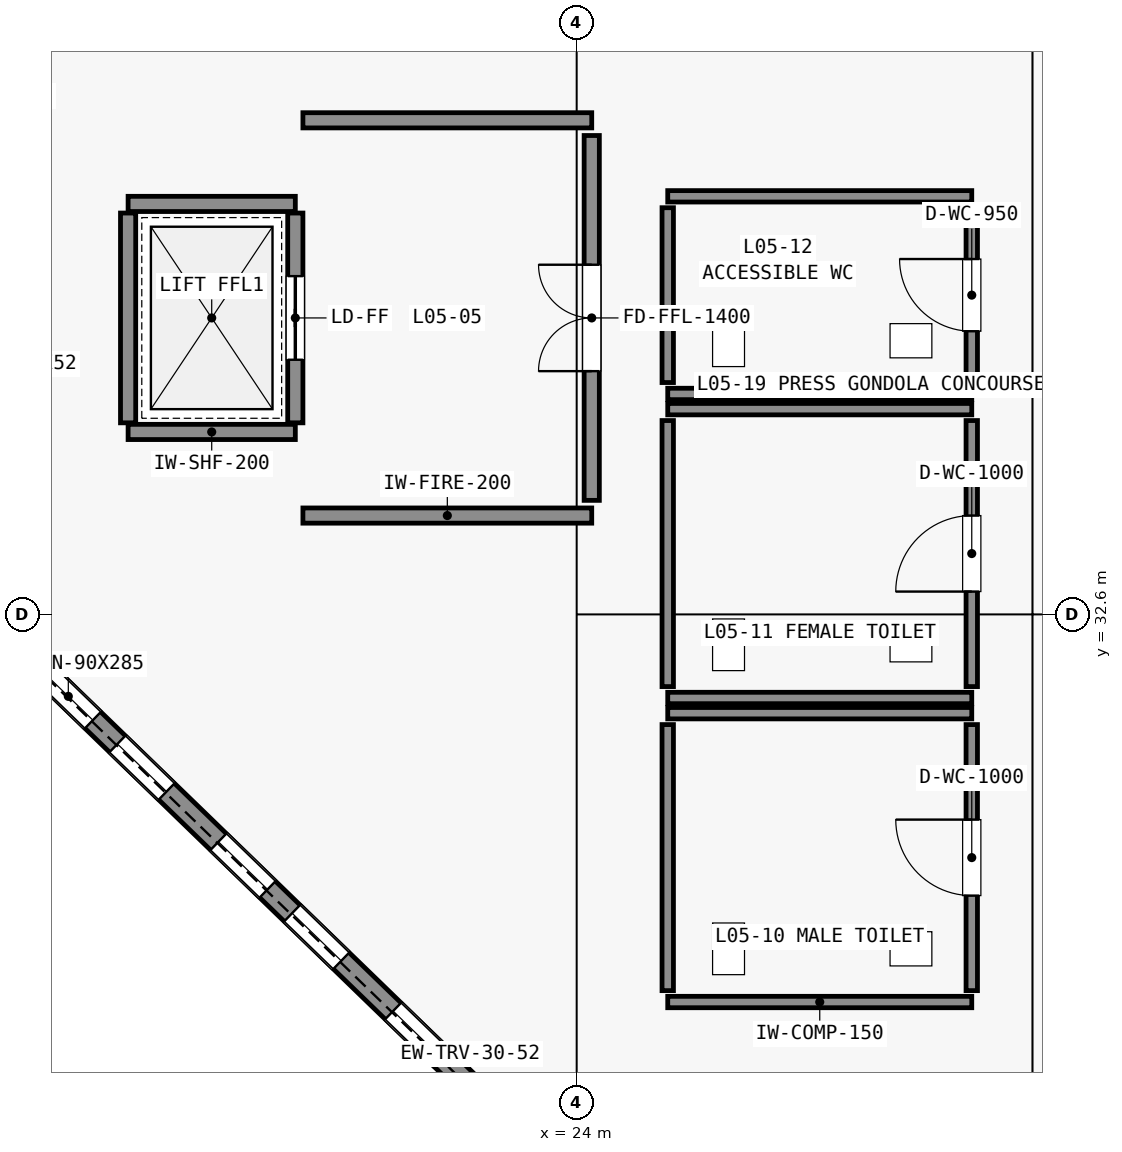
"""IFC4 building model, lengths in metres.
Left out: names, types, materials, properties, quantities, classifications, styles, units other than length and angle.
Written with IfcOpenShell. Run it as: python <this file> out.ifc"""

import sys

from ifc_helpers import new_model, si_unit, direction, frame, frame_2d, origin, place, context, subcontext, project, spatial, rectangle, extrude, element, fill, save


model = new_model("IFC4")
c1 = context("Model", 3, precision=1e-05, world=origin(), true_north=direction((0.0, 1.0)))
c2 = subcontext(c1, "Body", "Model", "MODEL_VIEW")
j1 = project(units=[si_unit("LENGTHUNIT", "METRE"), si_unit("PLANEANGLEUNIT", "RADIAN")], contexts=[c1])
p1 = place(None, origin())
s1 = spatial("IfcSite", under=j1, at=p1, CompositionType="ELEMENT")
p2 = place(p1, origin())
s2 = spatial("IfcBuilding", under=s1, at=p2, CompositionType="ELEMENT")
p3 = place(p2, frame((0.0, 0.0, 26.4)))
s3 = spatial("IfcBuildingStorey", under=s2, at=p3, CompositionType="ELEMENT", Elevation=26.4)
for number, where, z_axis, x_axis in (
    (1, (18.1, 35.0, 0.0), (0.0, 0.0, 1.0), (1.0, 0.0, 0.0)),
    (2, (18.1, 38.0, 0.0), (0.0, 0.0, 1.0), (1.0, 0.0, 0.0)),
):
    element("IfcWall", number, at=place(p3, frame(where, z_axis=z_axis, x_axis=x_axis)), inside=s3, PredefinedType="STANDARD", context=c2, shape_type="SweptSolid", body=[
        extrude(rectangle(XDim=2.2, YDim=0.2, at=frame_2d((1.1, 0.0))), origin(), (0.0, 0.0, 1.0), 5.18),
    ])
p4 = place(p3, frame((18.1, 35.12, 0.0), z_axis=(0.0, 0.0, 1.0), x_axis=(0.0, 1.0, 0.0)))
e3 = element("IfcWall", 3, at=p4, inside=s3, PredefinedType="STANDARD", context=c2, shape_type="SweptSolid", body=[
    extrude(rectangle(XDim=2.76, YDim=0.2, at=frame_2d((1.38, 0.0))), origin(), (0.0, 0.0, 1.0), 5.18),
])
p5 = place(p3, frame((20.3, 35.12, 0.0), z_axis=(0.0, 0.0, 1.0), x_axis=(0.0, 1.0, 0.0)))
e4 = element("IfcWall", 4, at=p5, inside=s3, PredefinedType="STANDARD", context=c2, shape_type="SweptSolid", body=[
    extrude(rectangle(XDim=2.76, YDim=0.2, at=frame_2d((1.38, 0.0))), origin(), (0.0, 0.0, 1.0), 5.18),
])
p6 = place(p5, frame((0.83, 0.0, 0.0)))
e5 = element("IfcOpeningElement", 5, at=p6, cuts=e4, PredefinedType="OPENING", context=c2, shape_type="SweptSolid", body=[
    extrude(rectangle(XDim=1.1, YDim=2.15, at=frame_2d((0.55, 1.075))), frame((0.0, 0.11, 0.0), z_axis=(0.0, -1.0, 0.0), x_axis=(1.0, 0.0, 0.0)), (0.0, 0.0, 1.0), 0.22),
])
p7 = place(p3, frame((16.2, 32.6, 0.0), z_axis=(0.0, 0.0, 1.0), x_axis=(0.718237441527, -0.695798086796, 0.0)))
e6 = element("IfcWall", 6, at=p7, inside=s3, PredefinedType="STANDARD", context=c2, shape_type="SweptSolid", body=[
    extrude(rectangle(XDim=17.822, YDim=0.3, at=frame_2d((8.911, 0.0))), origin(), (0.0, 0.0, 1.0), 5.18),
])
p8 = place(p7, frame((1.1, 0.0, 0.95)))
e7 = element("IfcOpeningElement", 7, at=p8, cuts=e6, PredefinedType="OPENING", context=c2, shape_type="SweptSolid", body=[
    extrude(rectangle(XDim=0.9, YDim=2.85, at=frame_2d((0.45, 1.425))), frame((0.0, 0.16, 0.0), z_axis=(0.0, -1.0, 0.0), x_axis=(1.0, 0.0, 0.0)), (0.0, 0.0, 1.0), 0.32),
])
p9 = place(p7, frame((2.45, 0.0, 0.95)))
e8 = element("IfcOpeningElement", 8, at=p9, cuts=e6, PredefinedType="OPENING", context=c2, shape_type="SweptSolid", body=[
    extrude(rectangle(XDim=0.9, YDim=2.85, at=frame_2d((0.45, 1.425))), frame((0.0, 0.16, 0.0), z_axis=(0.0, -1.0, 0.0), x_axis=(1.0, 0.0, 0.0)), (0.0, 0.0, 1.0), 0.32),
])
p10 = place(p7, frame((4.3, 0.0, 0.95)))
e9 = element("IfcOpeningElement", 9, at=p10, cuts=e6, PredefinedType="OPENING", context=c2, shape_type="SweptSolid", body=[
    extrude(rectangle(XDim=0.9, YDim=2.85, at=frame_2d((0.45, 1.425))), frame((0.0, 0.16, 0.0), z_axis=(0.0, -1.0, 0.0), x_axis=(1.0, 0.0, 0.0)), (0.0, 0.0, 1.0), 0.32),
])
p11 = place(p7, frame((5.65, 0.0, 0.95)))
e10 = element("IfcOpeningElement", 10, at=p11, cuts=e6, PredefinedType="OPENING", context=c2, shape_type="SweptSolid", body=[
    extrude(rectangle(XDim=0.9, YDim=2.85, at=frame_2d((0.45, 1.425))), frame((0.0, 0.16, 0.0), z_axis=(0.0, -1.0, 0.0), x_axis=(1.0, 0.0, 0.0)), (0.0, 0.0, 1.0), 0.32),
])
p12 = place(p7, frame((7.5, 0.0, 0.95)))
e11 = element("IfcOpeningElement", 11, at=p12, cuts=e6, PredefinedType="OPENING", context=c2, shape_type="SweptSolid", body=[
    extrude(rectangle(XDim=0.9, YDim=2.85, at=frame_2d((0.45, 1.425))), frame((0.0, 0.16, 0.0), z_axis=(0.0, -1.0, 0.0), x_axis=(1.0, 0.0, 0.0)), (0.0, 0.0, 1.0), 0.32),
])
p13 = place(p7, frame((8.85, 0.0, 0.95)))
e12 = element("IfcOpeningElement", 12, at=p13, cuts=e6, PredefinedType="OPENING", context=c2, shape_type="SweptSolid", body=[
    extrude(rectangle(XDim=0.9, YDim=2.85, at=frame_2d((0.45, 1.425))), frame((0.0, 0.16, 0.0), z_axis=(0.0, -1.0, 0.0), x_axis=(1.0, 0.0, 0.0)), (0.0, 0.0, 1.0), 0.32),
])
p14 = place(p7, frame((13.9, 0.0, 0.95)))
e13 = element("IfcOpeningElement", 13, at=p14, cuts=e6, PredefinedType="OPENING", context=c2, shape_type="SweptSolid", body=[
    extrude(rectangle(XDim=0.9, YDim=2.85, at=frame_2d((0.45, 1.425))), frame((0.0, 0.16, 0.0), z_axis=(0.0, -1.0, 0.0), x_axis=(1.0, 0.0, 0.0)), (0.0, 0.0, 1.0), 0.32),
])
p15 = place(p7, frame((15.25, 0.0, 0.95)))
e14 = element("IfcOpeningElement", 14, at=p15, cuts=e6, PredefinedType="OPENING", context=c2, shape_type="SweptSolid", body=[
    extrude(rectangle(XDim=0.9, YDim=2.85, at=frame_2d((0.45, 1.425))), frame((0.0, 0.16, 0.0), z_axis=(0.0, -1.0, 0.0), x_axis=(1.0, 0.0, 0.0)), (0.0, 0.0, 1.0), 0.32),
])
for number, where, z_axis, x_axis in (
    (15, (20.4, 33.9, 0.0), (0.0, 0.0, 1.0), (1.0, 0.0, 0.0)),
    (16, (20.4, 39.1, 0.0), (0.0, 0.0, 1.0), (1.0, 0.0, 0.0)),
):
    element("IfcWall", number, at=place(p3, frame(where, z_axis=z_axis, x_axis=x_axis)), inside=s3, PredefinedType="STANDARD", context=c2, shape_type="SweptSolid", body=[
        extrude(rectangle(XDim=3.8, YDim=0.2, at=frame_2d((1.9, 0.0))), origin(), (0.0, 0.0, 1.0), 5.18),
    ])
p16 = place(p3, frame((24.2, 34.1, 0.0), z_axis=(0.0, 0.0, 1.0), x_axis=(0.0, 1.0, 0.0)))
e17 = element("IfcWall", 17, at=p16, inside=s3, PredefinedType="STANDARD", context=c2, shape_type="SweptSolid", body=[
    extrude(rectangle(XDim=4.8, YDim=0.2, at=frame_2d((2.4, 0.0))), origin(), (0.0, 0.0, 1.0), 5.18),
])
p17 = place(p16, frame((1.7, 0.0, 0.0)))
e18 = element("IfcOpeningElement", 18, at=p17, cuts=e17, PredefinedType="OPENING", context=c2, shape_type="SweptSolid", body=[
    extrude(rectangle(XDim=1.4, YDim=2.2, at=frame_2d((0.7, 1.1))), frame((0.0, 0.11, 0.0), z_axis=(0.0, -1.0, 0.0), x_axis=(1.0, 0.0, 0.0)), (0.0, 0.0, 1.0), 0.22),
])
for number, where, z_axis, x_axis in (
    (19, (25.2, 27.5, 0.0), (0.0, 0.0, 1.0), (1.0, 0.0, 0.0)),
    (20, (25.2, 31.3, 0.0), (0.0, 0.0, 1.0), (1.0, 0.0, 0.0)),
):
    element("IfcWall", number, at=place(p3, frame(where, z_axis=z_axis, x_axis=x_axis)), inside=s3, PredefinedType="STANDARD", context=c2, shape_type="SweptSolid", body=[
        extrude(rectangle(XDim=4.0, YDim=0.15, at=frame_2d((2.0, 0.0))), origin(), (0.0, 0.0, 1.0), 5.18),
    ])
p18 = place(p3, frame((25.2, 27.65, 0.0), z_axis=(0.0, 0.0, 1.0), x_axis=(0.0, 1.0, 0.0)))
e21 = element("IfcWall", 21, at=p18, inside=s3, PredefinedType="STANDARD", context=c2, shape_type="SweptSolid", body=[
    extrude(rectangle(XDim=3.5, YDim=0.15, at=frame_2d((1.75, 0.0))), origin(), (0.0, 0.0, 1.0), 5.18),
])
p19 = place(p3, frame((29.2, 27.65, 0.0), z_axis=(0.0, 0.0, 1.0), x_axis=(0.0, 1.0, 0.0)))
e22 = element("IfcWall", 22, at=p19, inside=s3, PredefinedType="STANDARD", context=c2, shape_type="SweptSolid", body=[
    extrude(rectangle(XDim=3.5, YDim=0.15, at=frame_2d((1.75, 0.0))), origin(), (0.0, 0.0, 1.0), 5.18),
])
p20 = place(p19, frame((1.25, 0.0, 0.0)))
e23 = element("IfcOpeningElement", 23, at=p20, cuts=e22, PredefinedType="OPENING", context=c2, shape_type="SweptSolid", body=[
    extrude(rectangle(XDim=1.0, YDim=2.15, at=frame_2d((0.5, 1.075))), frame((0.0, 0.085, 0.0), z_axis=(0.0, -1.0, 0.0), x_axis=(1.0, 0.0, 0.0)), (0.0, 0.0, 1.0), 0.17),
])
for number, where, z_axis, x_axis in (
    (24, (25.2, 31.5, 0.0), (0.0, 0.0, 1.0), (1.0, 0.0, 0.0)),
    (25, (25.2, 35.3, 0.0), (0.0, 0.0, 1.0), (1.0, 0.0, 0.0)),
):
    element("IfcWall", number, at=place(p3, frame(where, z_axis=z_axis, x_axis=x_axis)), inside=s3, PredefinedType="STANDARD", context=c2, shape_type="SweptSolid", body=[
        extrude(rectangle(XDim=4.0, YDim=0.15, at=frame_2d((2.0, 0.0))), origin(), (0.0, 0.0, 1.0), 5.18),
    ])
p21 = place(p3, frame((25.2, 31.65, 0.0), z_axis=(0.0, 0.0, 1.0), x_axis=(0.0, 1.0, 0.0)))
e26 = element("IfcWall", 26, at=p21, inside=s3, PredefinedType="STANDARD", context=c2, shape_type="SweptSolid", body=[
    extrude(rectangle(XDim=3.5, YDim=0.15, at=frame_2d((1.75, 0.0))), origin(), (0.0, 0.0, 1.0), 5.18),
])
p22 = place(p3, frame((29.2, 31.65, 0.0), z_axis=(0.0, 0.0, 1.0), x_axis=(0.0, 1.0, 0.0)))
e27 = element("IfcWall", 27, at=p22, inside=s3, PredefinedType="STANDARD", context=c2, shape_type="SweptSolid", body=[
    extrude(rectangle(XDim=3.5, YDim=0.15, at=frame_2d((1.75, 0.0))), origin(), (0.0, 0.0, 1.0), 5.18),
])
p23 = place(p22, frame((1.25, 0.0, 0.0)))
e28 = element("IfcOpeningElement", 28, at=p23, cuts=e27, PredefinedType="OPENING", context=c2, shape_type="SweptSolid", body=[
    extrude(rectangle(XDim=1.0, YDim=2.15, at=frame_2d((0.5, 1.075))), frame((0.0, 0.085, 0.0), z_axis=(0.0, -1.0, 0.0), x_axis=(1.0, 0.0, 0.0)), (0.0, 0.0, 1.0), 0.17),
])
for number, where, z_axis, x_axis in (
    (29, (25.2, 35.5, 0.0), (0.0, 0.0, 1.0), (1.0, 0.0, 0.0)),
    (30, (25.2, 38.1, 0.0), (0.0, 0.0, 1.0), (1.0, 0.0, 0.0)),
):
    element("IfcWall", number, at=place(p3, frame(where, z_axis=z_axis, x_axis=x_axis)), inside=s3, PredefinedType="STANDARD", context=c2, shape_type="SweptSolid", body=[
        extrude(rectangle(XDim=4.0, YDim=0.15, at=frame_2d((2.0, 0.0))), origin(), (0.0, 0.0, 1.0), 5.18),
    ])
p24 = place(p3, frame((25.2, 35.65, 0.0), z_axis=(0.0, 0.0, 1.0), x_axis=(0.0, 1.0, 0.0)))
e31 = element("IfcWall", 31, at=p24, inside=s3, PredefinedType="STANDARD", context=c2, shape_type="SweptSolid", body=[
    extrude(rectangle(XDim=2.3, YDim=0.15, at=frame_2d((1.15, 0.0))), origin(), (0.0, 0.0, 1.0), 5.18),
])
p25 = place(p3, frame((29.2, 35.65, 0.0), z_axis=(0.0, 0.0, 1.0), x_axis=(0.0, 1.0, 0.0)))
e32 = element("IfcWall", 32, at=p25, inside=s3, PredefinedType="STANDARD", context=c2, shape_type="SweptSolid", body=[
    extrude(rectangle(XDim=2.3, YDim=0.15, at=frame_2d((1.15, 0.0))), origin(), (0.0, 0.0, 1.0), 5.18),
])
p26 = place(p25, frame((0.675, 0.0, 0.0)))
e33 = element("IfcOpeningElement", 33, at=p26, cuts=e32, PredefinedType="OPENING", context=c2, shape_type="SweptSolid", body=[
    extrude(rectangle(XDim=0.95, YDim=2.15, at=frame_2d((0.475, 1.075))), frame((0.0, 0.085, 0.0), z_axis=(0.0, -1.0, 0.0), x_axis=(1.0, 0.0, 0.0)), (0.0, 0.0, 1.0), 0.17),
])
p27 = place(p6, origin())
e34 = element("IfcDoor", 34, at=p27, inside=s3, OperationType="SLIDING_TO_LEFT", PredefinedType="DOOR", context=c2, shape_type="SweptSolid", body=[
    extrude(rectangle(XDim=1.1, YDim=2.15, at=frame_2d((0.55, 1.075))), frame((0.0, 0.025, 0.0), z_axis=(0.0, -1.0, 0.0), x_axis=(1.0, 0.0, 0.0)), (0.0, 0.0, 1.0), 0.05),
])
fill(e5, e34)
p28 = place(p8, origin())
e35 = element("IfcWindow", 35, at=p28, inside=s3, PartitioningType="DOUBLE_PANEL_VERTICAL", PredefinedType="WINDOW", context=c2, shape_type="SweptSolid", body=[
    extrude(rectangle(XDim=0.9, YDim=2.85, at=frame_2d((0.45, 1.425))), frame((0.0, 0.03, 0.0), z_axis=(0.0, -1.0, 0.0), x_axis=(1.0, 0.0, 0.0)), (0.0, 0.0, 1.0), 0.06),
])
fill(e7, e35)
p29 = place(p9, origin())
e36 = element("IfcWindow", 36, at=p29, inside=s3, PartitioningType="DOUBLE_PANEL_VERTICAL", PredefinedType="WINDOW", context=c2, shape_type="SweptSolid", body=[
    extrude(rectangle(XDim=0.9, YDim=2.85, at=frame_2d((0.45, 1.425))), frame((0.0, 0.03, 0.0), z_axis=(0.0, -1.0, 0.0), x_axis=(1.0, 0.0, 0.0)), (0.0, 0.0, 1.0), 0.06),
])
fill(e8, e36)
p30 = place(p10, origin())
e37 = element("IfcWindow", 37, at=p30, inside=s3, PartitioningType="DOUBLE_PANEL_VERTICAL", PredefinedType="WINDOW", context=c2, shape_type="SweptSolid", body=[
    extrude(rectangle(XDim=0.9, YDim=2.85, at=frame_2d((0.45, 1.425))), frame((0.0, 0.03, 0.0), z_axis=(0.0, -1.0, 0.0), x_axis=(1.0, 0.0, 0.0)), (0.0, 0.0, 1.0), 0.06),
])
fill(e9, e37)
p31 = place(p11, origin())
e38 = element("IfcWindow", 38, at=p31, inside=s3, PartitioningType="DOUBLE_PANEL_VERTICAL", PredefinedType="WINDOW", context=c2, shape_type="SweptSolid", body=[
    extrude(rectangle(XDim=0.9, YDim=2.85, at=frame_2d((0.45, 1.425))), frame((0.0, 0.03, 0.0), z_axis=(0.0, -1.0, 0.0), x_axis=(1.0, 0.0, 0.0)), (0.0, 0.0, 1.0), 0.06),
])
fill(e10, e38)
p32 = place(p12, origin())
e39 = element("IfcWindow", 39, at=p32, inside=s3, PartitioningType="DOUBLE_PANEL_VERTICAL", PredefinedType="WINDOW", context=c2, shape_type="SweptSolid", body=[
    extrude(rectangle(XDim=0.9, YDim=2.85, at=frame_2d((0.45, 1.425))), frame((0.0, 0.03, 0.0), z_axis=(0.0, -1.0, 0.0), x_axis=(1.0, 0.0, 0.0)), (0.0, 0.0, 1.0), 0.06),
])
fill(e11, e39)
p33 = place(p17, origin())
e40 = element("IfcDoor", 40, at=p33, inside=s3, OperationType="DOUBLE_DOOR_SINGLE_SWING", PredefinedType="DOOR", context=c2, shape_type="SweptSolid", body=[
    extrude(rectangle(XDim=1.4, YDim=2.2, at=frame_2d((0.7, 1.1))), frame((0.0, 0.025, 0.0), z_axis=(0.0, -1.0, 0.0), x_axis=(1.0, 0.0, 0.0)), (0.0, 0.0, 1.0), 0.05),
])
fill(e18, e40)
p34 = place(p20, origin())
e41 = element("IfcDoor", 41, at=p34, inside=s3, OperationType="SINGLE_SWING_RIGHT", PredefinedType="DOOR", context=c2, shape_type="SweptSolid", body=[
    extrude(rectangle(XDim=1.0, YDim=2.15, at=frame_2d((0.5, 1.075))), frame((0.0, 0.025, 0.0), z_axis=(0.0, -1.0, 0.0), x_axis=(1.0, 0.0, 0.0)), (0.0, 0.0, 1.0), 0.05),
])
fill(e23, e41)
p35 = place(p23, origin())
e42 = element("IfcDoor", 42, at=p35, inside=s3, OperationType="SINGLE_SWING_LEFT", PredefinedType="DOOR", context=c2, shape_type="SweptSolid", body=[
    extrude(rectangle(XDim=1.0, YDim=2.15, at=frame_2d((0.5, 1.075))), frame((0.0, 0.025, 0.0), z_axis=(0.0, -1.0, 0.0), x_axis=(1.0, 0.0, 0.0)), (0.0, 0.0, 1.0), 0.05),
])
fill(e28, e42)
p36 = place(p26, origin())
e43 = element("IfcDoor", 43, at=p36, inside=s3, OperationType="SINGLE_SWING_RIGHT", PredefinedType="DOOR", context=c2, shape_type="SweptSolid", body=[
    extrude(rectangle(XDim=0.95, YDim=2.15, at=frame_2d((0.475, 1.075))), frame((0.0, 0.025, 0.0), z_axis=(0.0, -1.0, 0.0), x_axis=(1.0, 0.0, 0.0)), (0.0, 0.0, 1.0), 0.05),
])
fill(e33, e43)
save(model, sys.argv[1])
